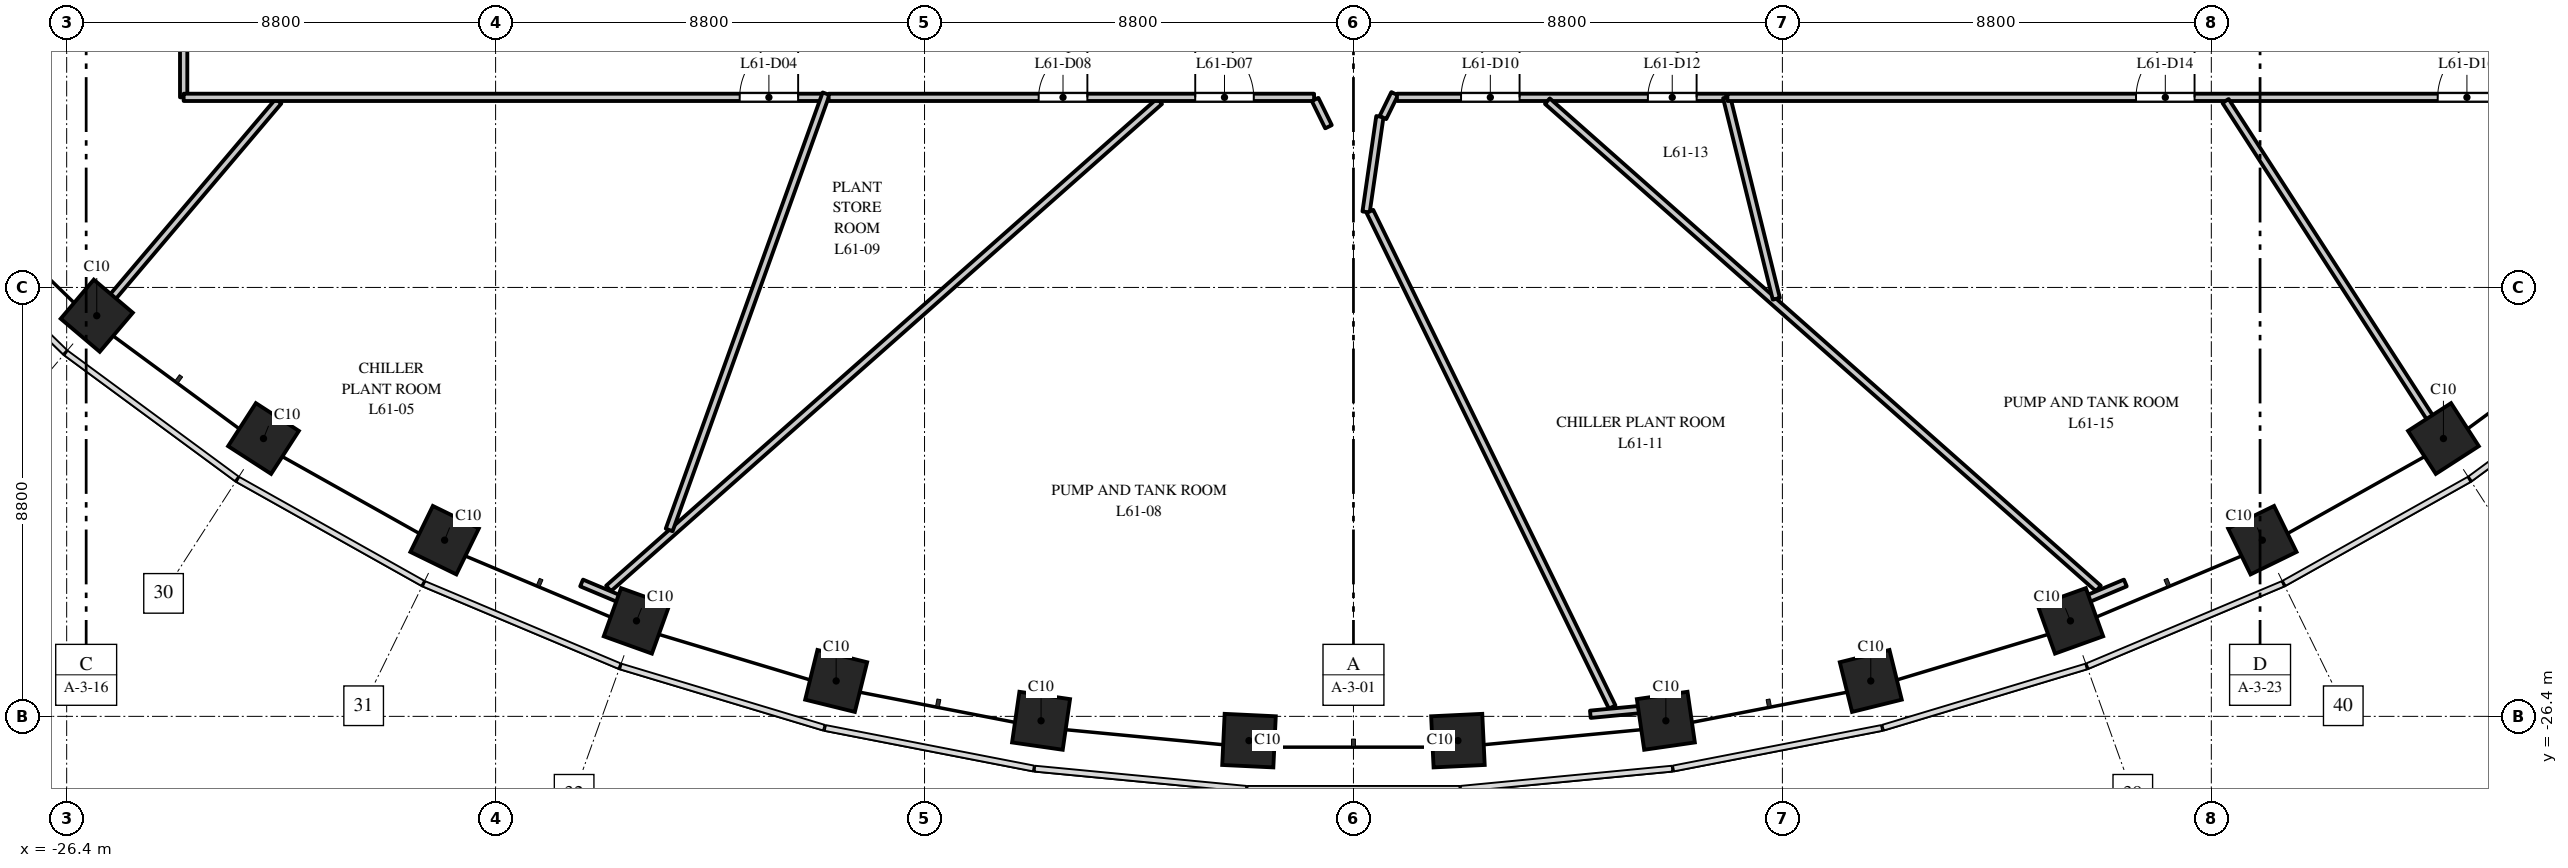
"""IFC4 building model, lengths in metres.
Left out: names, types, materials, properties, quantities, classifications, styles, units other than length and angle.
Written with IfcOpenShell. Run it as: python <this file> out.ifc"""

import sys

from ifc_helpers import new_model, si_unit, direction, frame, frame_2d, origin, origin_2d, place, context, subcontext, project, spatial, rectangle, extrude, element, fill, save


model = new_model("IFC4")
c1 = context("Model", 3, precision=1e-05, world=origin(), true_north=direction((0.0, 1.0)))
c2 = subcontext(c1, "Body", "Model", "MODEL_VIEW")
j1 = project(units=[si_unit("LENGTHUNIT", "METRE"), si_unit("PLANEANGLEUNIT", "RADIAN")], contexts=[c1])
p1 = place(None, origin())
s1 = spatial("IfcSite", under=j1, at=p1, CompositionType="ELEMENT")
p2 = place(p1, origin())
s2 = spatial("IfcBuilding", under=s1, at=p2, CompositionType="ELEMENT")
p3 = place(p2, frame((0.0, 0.0, 285.5)))
s3 = spatial("IfcBuildingStorey", under=s2, at=p3, CompositionType="ELEMENT", Elevation=285.5)
for number, where, z_axis, x_axis in (
    (1, (-25.783, -18.18, 0.0), (0.0, 0.0, 1.0), (0.763, -0.646, 0.0)),
    (2, (-22.362, -20.7, 0.0), (0.0, 0.0, 1.0), (0.84, -0.542, 0.0)),
    (3, (-18.646, -22.785, 0.0), (0.0, 0.0, 1.0), (0.898, -0.439, 0.0)),
    (4, (-14.709, -24.441, 0.0), (0.0, 0.0, 1.0), (0.941, -0.338, 0.0)),
    (5, (-10.613, -25.674, 0.0), (0.0, 0.0, 1.0), (0.971, -0.24, 0.0)),
    (6, (-6.409, -26.491, 0.0), (0.0, 0.0, 1.0), (0.99, -0.143, 0.0)),
    (7, (-2.143, -26.898, 0.0), (0.0, 0.0, 1.0), (0.999, -0.048, 0.0)),
    (8, (2.143, -26.898, 0.0), (0.0, 0.0, 1.0), (0.999, 0.048, 0.0)),
    (9, (6.409, -26.491, 0.0), (0.0, 0.0, 1.0), (0.99, 0.143, 0.0)),
    (10, (10.613, -25.674, 0.0), (0.0, 0.0, 1.0), (0.971, 0.24, 0.0)),
    (11, (14.709, -24.441, 0.0), (0.0, 0.0, 1.0), (0.941, 0.338, 0.0)),
    (12, (18.646, -22.785, 0.0), (0.0, 0.0, 1.0), (0.898, 0.439, 0.0)),
    (13, (22.362, -20.7, 0.0), (0.0, 0.0, 1.0), (0.84, 0.542, 0.0)),
):
    element("IfcColumn", number, at=place(p3, frame(where, z_axis=z_axis, x_axis=x_axis)), inside=s3, PredefinedType="COLUMN", context=c2, shape_type="SweptSolid", body=[
        extrude(rectangle(XDim=1.05, YDim=1.05, at=origin_2d()), origin(), (0.0, 0.0, 1.0), 5.5),
    ])
p4 = place(p3, frame((-25.847, -18.257, 0.0), z_axis=(0.0, 0.0, 1.0), x_axis=(0.646341150503, 0.763048568026, 0.0)))
e14 = element("IfcWall", 14, at=p4, inside=s3, PredefinedType="PARTITIONING", context=c2, shape_type="SweptSolid", body=[
    extrude(rectangle(XDim=5.87, YDim=0.15, at=frame_2d((2.935, 0.0))), origin(), (0.0, 0.0, 1.0), 4.25),
])
p5 = place(p3, frame((-24.0, -13.7, 0.0), z_axis=(0.0, 0.0, 1.0), x_axis=(0.0, 1.0, 0.0)))
e15 = element("IfcWall", 15, at=p5, inside=s3, PredefinedType="PARTITIONING", context=c2, shape_type="SweptSolid", body=[
    extrude(rectangle(XDim=3.0, YDim=0.15, at=frame_2d((1.5, 0.0))), origin(), (0.0, 0.0, 1.0), 5.2),
])
p6 = place(p5, frame((1.82, 0.0, 0.0)))
e16 = element("IfcOpeningElement", 16, at=p6, cuts=e15, PredefinedType="OPENING", context=c2, shape_type="SweptSolid", body=[
    extrude(rectangle(XDim=1.0, YDim=2.1, at=frame_2d((0.5, 1.05))), frame((0.0, 0.085, 0.0), z_axis=(0.0, -1.0, 0.0), x_axis=(1.0, 0.0, 0.0)), (0.0, 0.0, 1.0), 0.17),
])
p7 = place(p3, frame((-24.0, -13.7, 0.0), z_axis=(0.0, 0.0, 1.0), x_axis=(1.0, 0.0, 0.0)))
e17 = element("IfcWall", 17, at=p7, inside=s3, PredefinedType="PARTITIONING", context=c2, shape_type="SweptSolid", body=[
    extrude(rectangle(XDim=13.141, YDim=0.15, at=frame_2d((6.571, 0.0))), origin(), (0.0, 0.0, 1.0), 4.25),
])
p8 = place(p7, frame((11.407, 0.0, 0.0)))
e18 = element("IfcOpeningElement", 18, at=p8, cuts=e17, PredefinedType="OPENING", context=c2, shape_type="SweptSolid", body=[
    extrude(rectangle(XDim=1.2, YDim=2.1, at=frame_2d((0.6, 1.05))), frame((0.0, 0.085, 0.0), z_axis=(0.0, -1.0, 0.0), x_axis=(1.0, 0.0, 0.0)), (0.0, 0.0, 1.0), 0.17),
])
p9 = place(p3, frame((-15.283, -23.776, 0.0), z_axis=(0.0, 0.0, 1.0), x_axis=(0.749145369711, 0.662405627271, 0.0)))
e19 = element("IfcWall", 19, at=p9, inside=s3, PredefinedType="PARTITIONING", context=c2, shape_type="SweptSolid", body=[
    extrude(rectangle(XDim=15.092, YDim=0.15, at=frame_2d((7.546, 0.0))), origin(), (0.0, 0.0, 1.0), 4.35),
])
p10 = place(p3, frame((-14.039, -22.576, 0.0), z_axis=(0.0, 0.0, 1.0), x_axis=(0.338408619955, 0.940999259266, 0.0)))
e20 = element("IfcWall", 20, at=p10, inside=s3, PredefinedType="PARTITIONING", context=c2, shape_type="SweptSolid", body=[
    extrude(rectangle(XDim=9.512, YDim=0.15, at=frame_2d((4.756, 0.0))), origin(), (0.0, 0.0, 1.0), 5.2),
])
p11 = place(p3, frame((-10.767, -13.7, 0.0), z_axis=(0.0, 0.0, 1.0), x_axis=(1.0, 0.0, 0.0)))
e21 = element("IfcWall", 21, at=p11, inside=s3, PredefinedType="PARTITIONING", context=c2, shape_type="SweptSolid", body=[
    extrude(rectangle(XDim=9.959, YDim=0.15, at=frame_2d((4.979, 0.0))), origin(), (0.0, 0.0, 1.0), 4.35),
])
p12 = place(p11, frame((7.521, 0.0, 0.0)))
e22 = element("IfcOpeningElement", 22, at=p12, cuts=e21, PredefinedType="OPENING", context=c2, shape_type="SweptSolid", body=[
    extrude(rectangle(XDim=1.2, YDim=2.1, at=frame_2d((0.6, 1.05))), frame((0.0, 0.085, 0.0), z_axis=(0.0, -1.0, 0.0), x_axis=(1.0, 0.0, 0.0)), (0.0, 0.0, 1.0), 0.17),
])
p13 = place(p11, frame((4.308, 0.0, 0.0)))
e23 = element("IfcOpeningElement", 23, at=p13, cuts=e21, PredefinedType="OPENING", context=c2, shape_type="SweptSolid", body=[
    extrude(rectangle(XDim=1.0, YDim=2.1, at=frame_2d((0.5, 1.05))), frame((0.0, 0.085, 0.0), z_axis=(0.0, -1.0, 0.0), x_axis=(1.0, 0.0, 0.0)), (0.0, 0.0, 1.0), 0.17),
])
p14 = place(p3, frame((-0.787, -13.743, 0.0), z_axis=(0.0, 0.0, 1.0), x_axis=(0.440942587428, -0.897535311056, 0.0)))
e24 = element("IfcWall", 24, at=p14, inside=s3, PredefinedType="PARTITIONING", context=c2, shape_type="SweptSolid", body=[
    extrude(rectangle(XDim=0.624, YDim=0.15, at=frame_2d((0.312, 0.0))), origin(), (0.0, 0.0, 1.0), 5.2),
])
p15 = place(p3, frame((0.259, -16.052, 0.0), z_axis=(0.0, 0.0, 1.0), x_axis=(0.143027920195, 0.989718653984, 0.0)))
e25 = element("IfcWall", 25, at=p15, inside=s3, PredefinedType="PARTITIONING", context=c2, shape_type="SweptSolid", body=[
    extrude(rectangle(XDim=1.978, YDim=0.15, at=frame_2d((0.989, 0.0))), origin(), (0.0, 0.0, 1.0), 5.2),
])
p16 = place(p3, frame((0.337, -16.04, 0.0), z_axis=(0.0, 0.0, 1.0), x_axis=(0.439198527349, -0.898390034214, 0.0)))
e26 = element("IfcWall", 26, at=p16, inside=s3, PredefinedType="PARTITIONING", context=c2, shape_type="SweptSolid", body=[
    extrude(rectangle(XDim=11.32, YDim=0.15, at=frame_2d((5.66, 0.0))), origin(), (0.0, 0.0, 1.0), 4.4),
])
p17 = place(p3, frame((0.605, -14.114, 0.0), z_axis=(0.0, 0.0, 1.0), x_axis=(0.440568125066, 0.897719180577, 0.0)))
e27 = element("IfcWall", 27, at=p17, inside=s3, PredefinedType="PARTITIONING", context=c2, shape_type="SweptSolid", body=[
    extrude(rectangle(XDim=0.545, YDim=0.15, at=frame_2d((0.272, 0.0))), origin(), (0.0, 0.0, 1.0), 5.2),
])
p18 = place(p3, frame((0.892, -13.7, 0.0), z_axis=(0.0, 0.0, 1.0), x_axis=(1.0, 0.0, 0.0)))
e28 = element("IfcWall", 28, at=p18, inside=s3, PredefinedType="PARTITIONING", context=c2, shape_type="SweptSolid", body=[
    extrude(rectangle(XDim=6.764, YDim=0.15, at=frame_2d((3.382, 0.0))), origin(), (0.0, 0.0, 1.0), 4.35),
])
p19 = place(p18, frame((1.316, 0.0, 0.0)))
e29 = element("IfcOpeningElement", 29, at=p19, cuts=e28, PredefinedType="OPENING", context=c2, shape_type="SweptSolid", body=[
    extrude(rectangle(XDim=1.2, YDim=2.1, at=frame_2d((0.6, 1.05))), frame((0.0, 0.085, 0.0), z_axis=(0.0, -1.0, 0.0), x_axis=(1.0, 0.0, 0.0)), (0.0, 0.0, 1.0), 0.17),
])
p20 = place(p18, frame((5.148, 0.0, 0.0)))
e30 = element("IfcOpeningElement", 30, at=p20, cuts=e28, PredefinedType="OPENING", context=c2, shape_type="SweptSolid", body=[
    extrude(rectangle(XDim=1.0, YDim=2.1, at=frame_2d((0.5, 1.05))), frame((0.0, 0.085, 0.0), z_axis=(0.0, -1.0, 0.0), x_axis=(1.0, 0.0, 0.0)), (0.0, 0.0, 1.0), 0.17),
])
p21 = place(p3, frame((3.978, -13.778, 0.0), z_axis=(0.0, 0.0, 1.0), x_axis=(0.749092891723, -0.662464972335, 0.0)))
e31 = element("IfcWall", 31, at=p21, inside=s3, PredefinedType="PARTITIONING", context=c2, shape_type="SweptSolid", body=[
    extrude(rectangle(XDim=15.092, YDim=0.15, at=frame_2d((7.546, 0.0))), origin(), (0.0, 0.0, 1.0), 4.35),
])
p22 = place(p3, frame((7.656, -13.7, 0.0), z_axis=(0.0, 0.0, 1.0), x_axis=(0.239606320911, -0.970870130852, 0.0)))
e32 = element("IfcWall", 32, at=p22, inside=s3, PredefinedType="PARTITIONING", context=c2, shape_type="SweptSolid", body=[
    extrude(rectangle(XDim=4.257, YDim=0.15, at=frame_2d((2.128, 0.0))), origin(), (0.0, 0.0, 1.0), 5.2),
])
p23 = place(p3, frame((7.672, -13.7, 0.0), z_axis=(0.0, 0.0, 1.0), x_axis=(1.0, 0.0, 0.0)))
e33 = element("IfcWall", 33, at=p23, inside=s3, PredefinedType="PARTITIONING", context=c2, shape_type="SweptSolid", body=[
    extrude(rectangle(XDim=16.328, YDim=0.15, at=frame_2d((8.164, 0.0))), origin(), (0.0, 0.0, 1.0), 4.35),
])
p24 = place(p23, frame((8.384, 0.0, 0.0)))
e34 = element("IfcOpeningElement", 34, at=p24, cuts=e33, PredefinedType="OPENING", context=c2, shape_type="SweptSolid", body=[
    extrude(rectangle(XDim=1.2, YDim=2.1, at=frame_2d((0.6, 1.05))), frame((0.0, 0.085, 0.0), z_axis=(0.0, -1.0, 0.0), x_axis=(1.0, 0.0, 0.0)), (0.0, 0.0, 1.0), 0.17),
])
p25 = place(p23, frame((14.572, 0.0, 0.0)))
e35 = element("IfcOpeningElement", 35, at=p25, cuts=e33, PredefinedType="OPENING", context=c2, shape_type="SweptSolid", body=[
    extrude(rectangle(XDim=1.2, YDim=2.1, at=frame_2d((0.6, 1.05))), frame((0.0, 0.085, 0.0), z_axis=(0.0, -1.0, 0.0), x_axis=(1.0, 0.0, 0.0)), (0.0, 0.0, 1.0), 0.17),
])
p26 = place(p3, frame((17.892, -13.775, 0.0), z_axis=(0.0, 0.0, 1.0), x_axis=(0.542293508104, -0.840189116252, 0.0)))
e36 = element("IfcWall", 36, at=p26, inside=s3, PredefinedType="PARTITIONING", context=c2, shape_type="SweptSolid", body=[
    extrude(rectangle(XDim=8.342, YDim=0.15, at=frame_2d((4.171, 0.0))), origin(), (0.0, 0.0, 1.0), 5.2),
])
p27 = place(p3, frame((-15.836, -23.663, 0.0), z_axis=(0.0, 0.0, 1.0), x_axis=(0.921729013989, -0.38783453272, 0.0)))
e37 = element("IfcWall", 37, at=p27, inside=s3, PredefinedType="PARTITIONING", context=c2, shape_type="SweptSolid", body=[
    extrude(rectangle(XDim=0.834, YDim=0.15, at=frame_2d((0.417, 0.0))), origin(), (0.0, 0.0, 1.0), 5.2),
])
p28 = place(p3, frame((4.86, -26.357, 0.0), z_axis=(0.0, 0.0, 1.0), x_axis=(0.995478996725, 0.094981930274, 0.0)))
e38 = element("IfcWall", 38, at=p28, inside=s3, PredefinedType="PARTITIONING", context=c2, shape_type="SweptSolid", body=[
    extrude(rectangle(XDim=1.0, YDim=0.15, at=frame_2d((0.5, 0.0))), origin(), (0.0, 0.0, 1.0), 5.2),
])
p29 = place(p3, frame((15.067, -23.987, 0.0), z_axis=(0.0, 0.0, 1.0), x_axis=(0.921729013989, 0.38783453272, 0.0)))
e39 = element("IfcWall", 39, at=p29, inside=s3, PredefinedType="PARTITIONING", context=c2, shape_type="SweptSolid", body=[
    extrude(rectangle(XDim=0.834, YDim=0.15, at=frame_2d((0.417, 0.0))), origin(), (0.0, 0.0, 1.0), 5.2),
])
p30 = place(p8, origin())
e40 = element("IfcDoor", 40, at=p30, inside=s3, OperationType="SINGLE_SWING_RIGHT", PredefinedType="DOOR", context=c2, shape_type="SweptSolid", body=[
    extrude(rectangle(XDim=1.2, YDim=2.1, at=frame_2d((0.6, 1.05))), frame((0.0, 0.025, 0.0), z_axis=(0.0, -1.0, 0.0), x_axis=(1.0, 0.0, 0.0)), (0.0, 0.0, 1.0), 0.05),
])
fill(e18, e40)
p31 = place(p12, origin())
e41 = element("IfcDoor", 41, at=p31, inside=s3, OperationType="SINGLE_SWING_LEFT", PredefinedType="DOOR", context=c2, shape_type="SweptSolid", body=[
    extrude(rectangle(XDim=1.2, YDim=2.1, at=frame_2d((0.6, 1.05))), frame((0.0, 0.025, 0.0), z_axis=(0.0, -1.0, 0.0), x_axis=(1.0, 0.0, 0.0)), (0.0, 0.0, 1.0), 0.05),
])
fill(e22, e41)
p32 = place(p13, origin())
e42 = element("IfcDoor", 42, at=p32, inside=s3, OperationType="SINGLE_SWING_RIGHT", PredefinedType="DOOR", context=c2, shape_type="SweptSolid", body=[
    extrude(rectangle(XDim=1.0, YDim=2.1, at=frame_2d((0.5, 1.05))), frame((0.0, 0.025, 0.0), z_axis=(0.0, -1.0, 0.0), x_axis=(1.0, 0.0, 0.0)), (0.0, 0.0, 1.0), 0.05),
])
fill(e23, e42)
p33 = place(p19, origin())
e43 = element("IfcDoor", 43, at=p33, inside=s3, OperationType="SINGLE_SWING_RIGHT", PredefinedType="DOOR", context=c2, shape_type="SweptSolid", body=[
    extrude(rectangle(XDim=1.2, YDim=2.1, at=frame_2d((0.6, 1.05))), frame((0.0, 0.025, 0.0), z_axis=(0.0, -1.0, 0.0), x_axis=(1.0, 0.0, 0.0)), (0.0, 0.0, 1.0), 0.05),
])
fill(e29, e43)
p34 = place(p20, origin())
e44 = element("IfcDoor", 44, at=p34, inside=s3, OperationType="SINGLE_SWING_RIGHT", PredefinedType="DOOR", context=c2, shape_type="SweptSolid", body=[
    extrude(rectangle(XDim=1.0, YDim=2.1, at=frame_2d((0.5, 1.05))), frame((0.0, 0.025, 0.0), z_axis=(0.0, -1.0, 0.0), x_axis=(1.0, 0.0, 0.0)), (0.0, 0.0, 1.0), 0.05),
])
fill(e30, e44)
p35 = place(p24, origin())
e45 = element("IfcDoor", 45, at=p35, inside=s3, OperationType="SINGLE_SWING_RIGHT", PredefinedType="DOOR", context=c2, shape_type="SweptSolid", body=[
    extrude(rectangle(XDim=1.2, YDim=2.1, at=frame_2d((0.6, 1.05))), frame((0.0, 0.025, 0.0), z_axis=(0.0, -1.0, 0.0), x_axis=(1.0, 0.0, 0.0)), (0.0, 0.0, 1.0), 0.05),
])
fill(e34, e45)
p36 = place(p25, origin())
e46 = element("IfcDoor", 46, at=p36, inside=s3, OperationType="SINGLE_SWING_RIGHT", PredefinedType="DOOR", context=c2, shape_type="SweptSolid", body=[
    extrude(rectangle(XDim=1.2, YDim=2.1, at=frame_2d((0.6, 1.05))), frame((0.0, 0.025, 0.0), z_axis=(0.0, -1.0, 0.0), x_axis=(1.0, 0.0, 0.0)), (0.0, 0.0, 1.0), 0.05),
])
fill(e35, e46)
save(model, sys.argv[1])
